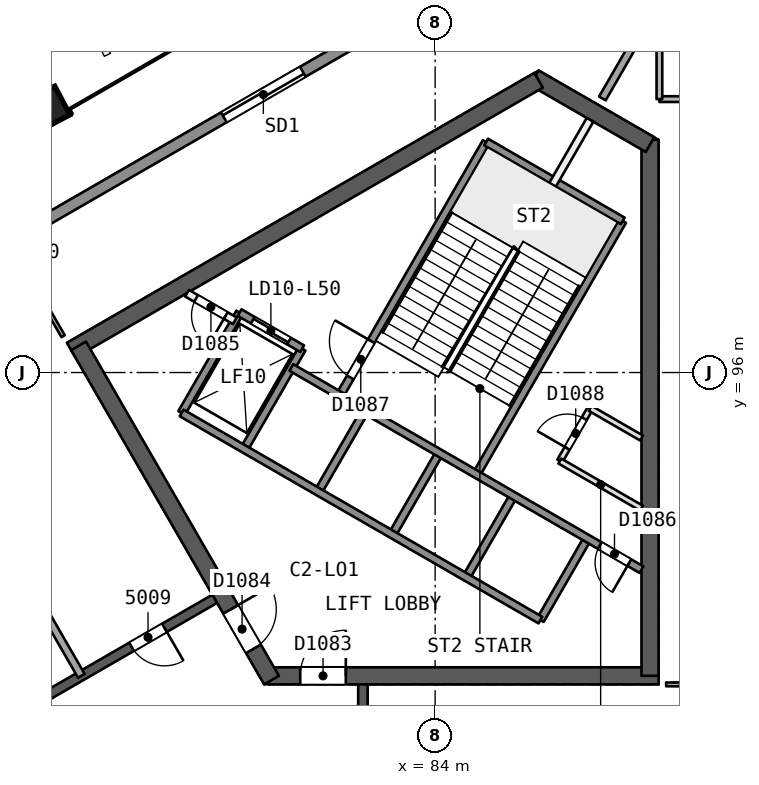
"""IFC4 building model, lengths in metres.
Left out: names, types, materials, properties, quantities, classifications, styles, units other than length and angle.
Written with IfcOpenShell. Run it as: python <this file> out.ifc"""

import sys

from ifc_helpers import new_model, si_unit, direction, frame, frame_2d, origin, origin_2d, place, context, subcontext, project, spatial, rectangle, extrude, element, fill, save


model = new_model("IFC4")
c1 = context("Model", 3, precision=1e-05, world=origin(), true_north=direction((0.0, 1.0)))
c2 = subcontext(c1, "Body", "Model", "MODEL_VIEW")
j1 = project(units=[si_unit("LENGTHUNIT", "METRE"), si_unit("PLANEANGLEUNIT", "RADIAN")], contexts=[c1])
p1 = place(None, origin())
s1 = spatial("IfcSite", under=j1, at=p1, CompositionType="ELEMENT")
p2 = place(p1, origin())
s2 = spatial("IfcBuilding", under=s1, at=p2, CompositionType="ELEMENT")
p3 = place(p2, frame((0.0, 0.0, 205.8)))
s3 = spatial("IfcBuildingStorey", under=s2, at=p3, CompositionType="ELEMENT", Elevation=205.8)
p4 = place(p3, frame((79.63, 88.019, 0.0), z_axis=(0.0, 0.0, 1.0), x_axis=(1.0, 0.0, 0.0)))
e1 = element("IfcWall", 1, at=p4, inside=s3, PredefinedType="SHEAR", context=c2, shape_type="SweptSolid", body=[
    extrude(rectangle(XDim=10.25, YDim=0.45, at=frame_2d((5.125, 0.0))), origin(), (0.0, 0.0, 1.0), 3.7),
])
p5 = place(p4, frame((0.82, 0.0, 0.0)))
e2 = element("IfcOpeningElement", 2, at=p5, cuts=e1, PredefinedType="OPENING", context=c2, shape_type="SweptSolid", body=[
    extrude(rectangle(XDim=1.2, YDim=2.1, at=frame_2d((0.6, 1.05))), frame((0.0, 0.235, 0.0), z_axis=(0.0, -1.0, 0.0), x_axis=(1.0, 0.0, 0.0)), (0.0, 0.0, 1.0), 0.471),
])
p6 = place(p3, frame((89.655, 88.019, 0.0), z_axis=(0.0, 0.0, 1.0), x_axis=(0.0, 1.0, 0.0)))
e3 = element("IfcWall", 3, at=p6, inside=s3, PredefinedType="SHEAR", context=c2, shape_type="SweptSolid", body=[
    extrude(rectangle(XDim=14.108, YDim=0.45, at=frame_2d((7.054, 0.0))), origin(), (0.0, 0.0, 1.0), 3.7),
])
p7 = place(p3, frame((89.655, 101.998, 0.0), z_axis=(0.0, 0.0, 1.0), x_axis=(-0.866042179588, 0.49997094233, 0.0)))
e4 = element("IfcWall", 4, at=p7, inside=s3, PredefinedType="SHEAR", context=c2, shape_type="SweptSolid", body=[
    extrude(rectangle(XDim=3.515, YDim=0.45, at=frame_2d((1.758, 0.0))), origin(), (0.0, 0.0, 1.0), 3.7),
])
p8 = place(p3, frame((86.723, 103.69, 0.0), z_axis=(0.0, 0.0, 1.0), x_axis=(-0.866022713978, -0.500004658852, 0.0)))
e5 = element("IfcWall", 5, at=p8, inside=s3, PredefinedType="SHEAR", context=c2, shape_type="SweptSolid", body=[
    extrude(rectangle(XDim=14.203, YDim=0.45, at=frame_2d((7.102, 0.0))), origin(), (0.0, 0.0, 1.0), 3.7),
])
p9 = place(p3, frame((74.617, 96.701, 0.0), z_axis=(0.0, 0.0, 1.0), x_axis=(0.499994385119, -0.866028645513, 0.0)))
e6 = element("IfcWall", 6, at=p9, inside=s3, PredefinedType="SHEAR", context=c2, shape_type="SweptSolid", body=[
    extrude(rectangle(XDim=10.155, YDim=0.45, at=frame_2d((5.077, 0.0))), origin(), (0.0, 0.0, 1.0), 3.7),
])
p10 = place(p9, frame((8.005, 0.0, 0.0)))
e7 = element("IfcOpeningElement", 7, at=p10, cuts=e6, PredefinedType="OPENING", context=c2, shape_type="SweptSolid", body=[
    extrude(rectangle(XDim=1.2, YDim=2.1, at=frame_2d((0.6, 1.05))), frame((0.0, 0.235, 0.0), z_axis=(0.0, -1.0, 0.0), x_axis=(1.0, 0.0, 0.0)), (0.0, 0.0, 1.0), 0.471),
])
p11 = place(p3, frame((82.1, 72.206, 0.0), z_axis=(0.0, 0.0, 1.0), x_axis=(0.0, 1.0, 0.0)))
e8 = element("IfcWall", 8, at=p11, inside=s3, PredefinedType="SHEAR", context=c2, shape_type="SweptSolid", body=[
    extrude(rectangle(XDim=15.588, YDim=0.25, at=frame_2d((7.794, 0.0))), origin(), (0.0, 0.0, 1.0), 3.3),
])
p12 = place(p11, frame((2.618, 0.0, 0.0)))
e9 = element("IfcOpeningElement", 9, at=p12, cuts=e8, PredefinedType="OPENING", context=c2, shape_type="SweptSolid", body=[
    extrude(rectangle(XDim=1.0, YDim=2.1, at=frame_2d((0.5, 1.05))), frame((0.0, 0.135, 0.0), z_axis=(0.0, -1.0, 0.0), x_axis=(1.0, 0.0, 0.0)), (0.0, 0.0, 1.0), 0.271),
])
p13 = place(p11, frame((8.627, 0.0, 0.0)))
e10 = element("IfcOpeningElement", 10, at=p13, cuts=e8, PredefinedType="OPENING", context=c2, shape_type="SweptSolid", body=[
    extrude(rectangle(XDim=1.1, YDim=2.1, at=frame_2d((0.55, 1.05))), frame((0.0, 0.135, 0.0), z_axis=(0.0, -1.0, 0.0), x_axis=(1.0, 0.0, 0.0)), (0.0, 0.0, 1.0), 0.271),
])
p14 = place(p11, frame((12.282, 0.0, 0.0)))
e11 = element("IfcOpeningElement", 11, at=p14, cuts=e8, PredefinedType="OPENING", context=c2, shape_type="SweptSolid", body=[
    extrude(rectangle(XDim=1.0, YDim=2.1, at=frame_2d((0.5, 1.05))), frame((0.0, 0.135, 0.0), z_axis=(0.0, -1.0, 0.0), x_axis=(1.0, 0.0, 0.0)), (0.0, 0.0, 1.0), 0.271),
])
p15 = place(p3, frame((78.2, 90.046, 0.0), z_axis=(0.0, 0.0, 1.0), x_axis=(-0.866026492143, -0.499998114903, 0.0)))
e12 = element("IfcWall", 12, at=p15, inside=s3, PredefinedType="SHEAR", context=c2, shape_type="SweptSolid", body=[
    extrude(rectangle(XDim=15.588, YDim=0.25, at=frame_2d((7.794, 0.0))), origin(), (0.0, 0.0, 1.0), 3.3),
])
p16 = place(p15, frame((1.527, 0.0, 0.0)))
e13 = element("IfcOpeningElement", 13, at=p16, cuts=e12, PredefinedType="OPENING", context=c2, shape_type="SweptSolid", body=[
    extrude(rectangle(XDim=1.0, YDim=2.1, at=frame_2d((0.5, 1.05))), frame((0.0, 0.135, 0.0), z_axis=(0.0, -1.0, 0.0), x_axis=(1.0, 0.0, 0.0)), (0.0, 0.0, 1.0), 0.271),
])
p17 = place(p15, frame((8.694, 0.0, 0.0)))
e14 = element("IfcOpeningElement", 14, at=p17, cuts=e12, PredefinedType="OPENING", context=c2, shape_type="SweptSolid", body=[
    extrude(rectangle(XDim=1.1, YDim=2.1, at=frame_2d((0.55, 1.05))), frame((0.0, 0.135, 0.0), z_axis=(0.0, -1.0, 0.0), x_axis=(1.0, 0.0, 0.0)), (0.0, 0.0, 1.0), 0.271),
])
p18 = place(p15, frame((13.062, 0.0, 0.0)))
e15 = element("IfcOpeningElement", 15, at=p18, cuts=e12, PredefinedType="OPENING", context=c2, shape_type="SweptSolid", body=[
    extrude(rectangle(XDim=1.0, YDim=2.1, at=frame_2d((0.5, 1.05))), frame((0.0, 0.135, 0.0), z_axis=(0.0, -1.0, 0.0), x_axis=(1.0, 0.0, 0.0)), (0.0, 0.0, 1.0), 0.271),
])
p19 = place(p3, frame((73.813, 102.987, 0.0), z_axis=(0.000857578916, -0.022824792675, 0.999739112668), x_axis=(0.866059992904, 0.499826241631, 0.010668498825)))
e16 = element("IfcColumn", 16, at=p19, inside=s3, PredefinedType="COLUMN", context=c2, shape_type="SweptSolid", body=[
    extrude(rectangle(XDim=0.85, YDim=0.85, at=origin_2d()), origin(), (0.0, 0.0, 1.0), 3.701),
])
p20 = place(p3, frame((92.802, 87.794, 0.0), z_axis=(0.0, 0.0, 1.0), x_axis=(-1.0, 0.0, 0.0)))
e17 = element("IfcWall", 17, at=p20, inside=s3, PredefinedType="PARTITIONING", context=c2, shape_type="SweptSolid", body=[
    extrude(rectangle(XDim=2.723, YDim=0.1, at=frame_2d((1.361, 0.0))), origin(), (0.0, 0.0, 1.0), 3.3),
])
p21 = place(p20, frame((0.911, 0.0, 0.0)))
e18 = element("IfcOpeningElement", 18, at=p21, cuts=e17, PredefinedType="OPENING", context=c2, shape_type="SweptSolid", body=[
    extrude(rectangle(XDim=0.9, YDim=2.1, at=frame_2d((0.45, 1.05))), frame((0.0, 0.061, 0.0), z_axis=(0.0, -1.0, 0.0), x_axis=(1.0, 0.0, 0.0)), (0.0, 0.0, 1.0), 0.121),
])
p22 = place(p3, frame((92.802, 103.194, 0.0), z_axis=(0.0, 0.0, 1.0), x_axis=(-1.0, 0.0, 0.0)))
e19 = element("IfcWall", 19, at=p22, inside=s3, PredefinedType="PARTITIONING", context=c2, shape_type="SweptSolid", body=[
    extrude(rectangle(XDim=2.9, YDim=0.15, at=frame_2d((1.45, 0.0))), origin(), (0.0, 0.0, 1.0), 3.3),
])
p23 = place(p22, frame((1.05, 0.0, 0.0)))
e20 = element("IfcOpeningElement", 20, at=p23, cuts=e19, PredefinedType="OPENING", context=c2, shape_type="SweptSolid", body=[
    extrude(rectangle(XDim=0.8, YDim=2.1, at=frame_2d((0.4, 1.05))), frame((0.0, 0.085, 0.0), z_axis=(0.0, -1.0, 0.0), x_axis=(1.0, 0.0, 0.0)), (0.0, 0.0, 1.0), 0.171),
])
p24 = place(p3, frame((89.902, 103.194, 0.0), z_axis=(0.0, 0.0, 1.0), x_axis=(0.0, 1.0, 0.0)))
e21 = element("IfcWall", 21, at=p24, inside=s3, PredefinedType="PARTITIONING", context=c2, shape_type="SweptSolid", body=[
    extrude(rectangle(XDim=2.6, YDim=0.15, at=frame_2d((1.3, 0.0))), origin(), (0.0, 0.0, 1.0), 3.3),
])
p25 = place(p3, frame((90.59, 107.002, 0.0), z_axis=(0.0, 0.0, 1.0), x_axis=(-0.500002498361, -0.86602396135, 0.0)))
e22 = element("IfcWall", 22, at=p25, inside=s3, PredefinedType="PARTITIONING", context=c2, shape_type="SweptSolid", body=[
    extrude(rectangle(XDim=4.377, YDim=0.2, at=frame_2d((2.188, 0.0))), origin(), (0.0, 0.0, 1.0), 3.3),
])
p26 = place(p3, frame((74.21, 96.956, 0.0), z_axis=(0.0, 0.0, 1.0), x_axis=(-0.499957886064, 0.866049716911, 0.0)))
e23 = element("IfcWall", 23, at=p26, inside=s3, PredefinedType="PARTITIONING", context=c2, shape_type="SweptSolid", body=[
    extrude(rectangle(XDim=2.723, YDim=0.1, at=frame_2d((1.361, 0.0))), origin(), (0.0, 0.0, 1.0), 3.3),
])
p27 = place(p26, frame((0.911, 0.0, 0.0)))
e24 = element("IfcOpeningElement", 24, at=p27, cuts=e23, PredefinedType="OPENING", context=c2, shape_type="SweptSolid", body=[
    extrude(rectangle(XDim=0.9, YDim=2.1, at=frame_2d((0.45, 1.05))), frame((0.0, 0.061, 0.0), z_axis=(0.0, -1.0, 0.0), x_axis=(1.0, 0.0, 0.0)), (0.0, 0.0, 1.0), 0.121),
])
p28 = place(p3, frame((69.339, 97.287, 0.0), z_axis=(0.0, 0.0, 1.0), x_axis=(0.499993653641, -0.866029067825, 0.0)))
e25 = element("IfcWall", 25, at=p28, inside=s3, PredefinedType="PARTITIONING", context=c2, shape_type="SweptSolid", body=[
    extrude(rectangle(XDim=10.702, YDim=0.2, at=frame_2d((5.351, 0.0))), origin(), (0.0, 0.0, 1.0), 3.3),
])
p29 = place(p3, frame((43.672, 82.641, 0.0), z_axis=(0.0, 0.0, 1.0), x_axis=(0.866024917385, 0.500000842468, 0.0)))
e26 = element("IfcWall", 26, at=p29, inside=s3, PredefinedType="SOLIDWALL", context=c2, shape_type="SweptSolid", body=[
    extrude(rectangle(XDim=51.621, YDim=0.3, at=frame_2d((25.811, 0.0))), origin(), (0.0, 0.0, 1.0), 3.3),
])
p30 = place(p29, frame((24.611, 0.0, 0.0)))
e27 = element("IfcOpeningElement", 27, at=p30, cuts=e26, PredefinedType="OPENING", context=c2, shape_type="SweptSolid", body=[
    extrude(rectangle(XDim=2.4, YDim=2.4, at=frame_2d((1.2, 1.2))), frame((0.0, 0.161, 0.0), z_axis=(0.0, -1.0, 0.0), x_axis=(1.0, 0.0, 0.0)), (0.0, 0.0, 1.0), 0.321),
])
p31 = place(p29, frame((30.378, 0.0, 0.0)))
e28 = element("IfcOpeningElement", 28, at=p31, cuts=e26, PredefinedType="OPENING", context=c2, shape_type="SweptSolid", body=[
    extrude(rectangle(XDim=2.4, YDim=2.4, at=frame_2d((1.2, 1.2))), frame((0.0, 0.161, 0.0), z_axis=(0.0, -1.0, 0.0), x_axis=(1.0, 0.0, 0.0)), (0.0, 0.0, 1.0), 0.321),
])
p32 = place(p29, frame((40.147, 0.0, 0.0)))
e29 = element("IfcOpeningElement", 29, at=p32, cuts=e26, PredefinedType="OPENING", context=c2, shape_type="SweptSolid", body=[
    extrude(rectangle(XDim=2.4, YDim=2.4, at=frame_2d((1.2, 1.2))), frame((0.0, 0.161, 0.0), z_axis=(0.0, -1.0, 0.0), x_axis=(1.0, 0.0, 0.0)), (0.0, 0.0, 1.0), 0.321),
])
p33 = place(p29, frame((18.843, 0.0, 0.0)))
e30 = element("IfcOpeningElement", 30, at=p33, cuts=e26, PredefinedType="OPENING", context=c2, shape_type="SweptSolid", body=[
    extrude(rectangle(XDim=2.4, YDim=2.4, at=frame_2d((1.2, 1.2))), frame((0.0, 0.161, 0.0), z_axis=(0.0, -1.0, 0.0), x_axis=(1.0, 0.0, 0.0)), (0.0, 0.0, 1.0), 0.321),
])
p34 = place(p29, frame((9.107, 0.0, 0.0)))
e31 = element("IfcOpeningElement", 31, at=p34, cuts=e26, PredefinedType="OPENING", context=c2, shape_type="SweptSolid", body=[
    extrude(rectangle(XDim=2.4, YDim=2.4, at=frame_2d((1.2, 1.2))), frame((0.0, 0.161, 0.0), z_axis=(0.0, -1.0, 0.0), x_axis=(1.0, 0.0, 0.0)), (0.0, 0.0, 1.0), 0.321),
])
p35 = place(p3, frame((86.77, 89.486, 0.0), z_axis=(0.0, 0.0, 1.0), x_axis=(0.499961042966, 0.86604789447, 0.0)))
e32 = element("IfcWall", 32, at=p35, inside=s3, PredefinedType="SOLIDWALL", context=c2, shape_type="SweptSolid", body=[
    extrude(rectangle(XDim=2.48, YDim=0.2, at=frame_2d((1.24, 0.0))), origin(), (0.0, 0.0, 1.0), 3.3),
])
p36 = place(p3, frame((87.281, 93.671, 0.0), z_axis=(0.0, 0.0, 1.0), x_axis=(0.499880961361, 0.866094119867, 0.0)))
e33 = element("IfcWall", 33, at=p36, inside=s3, PredefinedType="PARTITIONING", context=c2, shape_type="SweptSolid", body=[
    extrude(rectangle(XDim=1.6, YDim=0.15, at=frame_2d((0.8, 0.0))), origin(), (0.0, 0.0, 1.0), 3.3),
])
p37 = place(p36, frame((0.387, 0.0, 0.0)))
e34 = element("IfcOpeningElement", 34, at=p37, cuts=e33, PredefinedType="OPENING", context=c2, shape_type="SweptSolid", body=[
    extrude(rectangle(XDim=0.9, YDim=2.1, at=frame_2d((0.45, 1.05))), frame((0.0, 0.085, 0.0), z_axis=(0.0, -1.0, 0.0), x_axis=(1.0, 0.0, 0.0)), (0.0, 0.0, 1.0), 0.171),
])
p38 = place(p3, frame((84.821, 90.611, 0.0), z_axis=(0.0, 0.0, 1.0), x_axis=(0.499961042966, 0.86604789447, 0.0)))
e35 = element("IfcWall", 35, at=p38, inside=s3, PredefinedType="SOLIDWALL", context=c2, shape_type="SweptSolid", body=[
    extrude(rectangle(XDim=2.48, YDim=0.2, at=frame_2d((1.24, 0.0))), origin(), (0.0, 0.0, 1.0), 3.3),
])
p39 = place(p3, frame((85.087, 93.321, 0.0), z_axis=(0.0, 0.0, 1.0), x_axis=(0.500019787375, 0.866013979237, 0.0)))
e36 = element("IfcWall", 36, at=p39, inside=s3, PredefinedType="SOLIDWALL", context=c2, shape_type="SweptSolid", body=[
    extrude(rectangle(XDim=7.7, YDim=0.2, at=frame_2d((3.85, 0.0))), origin(), (0.0, 0.0, 1.0), 3.3),
])
p40 = place(p3, frame((82.873, 91.736, 0.0), z_axis=(0.0, 0.0, 1.0), x_axis=(0.499961042966, 0.86604789447, 0.0)))
e37 = element("IfcWall", 37, at=p40, inside=s3, PredefinedType="SOLIDWALL", context=c2, shape_type="SweptSolid", body=[
    extrude(rectangle(XDim=2.48, YDim=0.2, at=frame_2d((1.24, 0.0))), origin(), (0.0, 0.0, 1.0), 3.3),
])
p41 = place(p3, frame((87.09, 100.94, 0.0), z_axis=(0.0, 0.0, 1.0), x_axis=(0.500011643316, 0.866018681408, 0.0)))
e38 = element("IfcWall", 38, at=p41, inside=s3, PredefinedType="PARTITIONING", context=c2, shape_type="SweptSolid", body=[
    extrude(rectangle(XDim=1.973, YDim=0.2, at=frame_2d((0.987, 0.0))), origin(), (0.0, 0.0, 1.0), 3.3),
])
p42 = place(p3, frame((80.924, 92.861, 0.0), z_axis=(0.0, 0.0, 1.0), x_axis=(0.499961042966, 0.86604789447, 0.0)))
e39 = element("IfcWall", 39, at=p42, inside=s3, PredefinedType="SOLIDWALL", context=c2, shape_type="SweptSolid", body=[
    extrude(rectangle(XDim=2.48, YDim=0.2, at=frame_2d((1.24, 0.0))), origin(), (0.0, 0.0, 1.0), 3.3),
])
p43 = place(p3, frame((81.493, 95.396, 0.0), z_axis=(0.0, 0.0, 1.0), x_axis=(0.500006057782, 0.866021906294, 0.0)))
e40 = element("IfcWall", 40, at=p43, inside=s3, PredefinedType="SOLIDWALL", context=c2, shape_type="SweptSolid", body=[
    extrude(rectangle(XDim=7.7, YDim=0.2, at=frame_2d((3.85, 0.0))), origin(), (0.0, 0.0, 1.0), 3.3),
])
p44 = place(p43, frame((0.55, 0.0, 0.0)))
e41 = element("IfcOpeningElement", 41, at=p44, cuts=e40, PredefinedType="OPENING", context=c2, shape_type="SweptSolid", body=[
    extrude(rectangle(XDim=1.1, YDim=2.1, at=frame_2d((0.55, 1.05))), frame((0.0, 0.11, 0.0), z_axis=(0.0, -1.0, 0.0), x_axis=(1.0, 0.0, 0.0)), (0.0, 0.0, 1.0), 0.221),
])
for number, where, z_axis, x_axis in (
    (42, (78.976, 93.986, 0.0), (0.0, 0.0, 1.0), (0.5, 0.866, 0.0)),
    (43, (77.33, 94.936, 0.0), (0.0, 0.0, 1.0), (0.5, 0.866, 0.0)),
):
    element("IfcWall", number, at=place(p3, frame(where, z_axis=z_axis, x_axis=x_axis)), inside=s3, PredefinedType="SOLIDWALL", context=c2, shape_type="SweptSolid", body=[
        extrude(rectangle(XDim=3.05, YDim=0.2, at=frame_2d((1.525, 0.0))), origin(), (0.0, 0.0, 1.0), 3.3),
    ])
p45 = place(p3, frame((86.77, 89.486, 0.0), z_axis=(0.0, 0.0, 1.0), x_axis=(-0.86601811187, 0.500012629753, 0.0)))
e44 = element("IfcWall", 44, at=p45, inside=s3, PredefinedType="SOLIDWALL", context=c2, shape_type="SweptSolid", body=[
    extrude(rectangle(XDim=10.9, YDim=0.2, at=frame_2d((5.45, 0.0))), origin(), (0.0, 0.0, 1.0), 3.3),
])
p46 = place(p3, frame((89.43, 90.814, 0.0), z_axis=(0.0, 0.0, 1.0), x_axis=(-0.866018983788, 0.500011119594, 0.0)))
e45 = element("IfcWall", 45, at=p46, inside=s3, PredefinedType="SOLIDWALL", context=c2, shape_type="SweptSolid", body=[
    extrude(rectangle(XDim=10.64, YDim=0.2, at=frame_2d((5.32, 0.0))), origin(), (0.0, 0.0, 1.0), 3.3),
])
p47 = place(p46, frame((0.37, 0.0, 0.0)))
e46 = element("IfcOpeningElement", 46, at=p47, cuts=e45, PredefinedType="OPENING", context=c2, shape_type="SweptSolid", body=[
    extrude(rectangle(XDim=0.9, YDim=2.1, at=frame_2d((0.45, 1.05))), frame((0.0, 0.11, 0.0), z_axis=(0.0, -1.0, 0.0), x_axis=(1.0, 0.0, 0.0)), (0.0, 0.0, 1.0), 0.221),
])
p48 = place(p3, frame((78.73, 97.361, 0.0), z_axis=(0.0, 0.0, 1.0), x_axis=(-0.866045896294, 0.499964504253, 0.0)))
e47 = element("IfcWall", 47, at=p48, inside=s3, PredefinedType="PARTITIONING", context=c2, shape_type="SweptSolid", body=[
    extrude(rectangle(XDim=1.455, YDim=0.2, at=frame_2d((0.728, 0.0))), origin(), (0.0, 0.0, 1.0), 3.3),
])
p49 = place(p48, frame((0.278, 0.0, 0.0)))
e48 = element("IfcOpeningElement", 48, at=p49, cuts=e47, PredefinedType="OPENING", context=c2, shape_type="SweptSolid", body=[
    extrude(rectangle(XDim=0.9, YDim=2.1, at=frame_2d((0.45, 1.05))), frame((0.0, 0.11, 0.0), z_axis=(0.0, -1.0, 0.0), x_axis=(1.0, 0.0, 0.0)), (0.0, 0.0, 1.0), 0.221),
])
p50 = place(p3, frame((80.5, 96.627, 0.0), z_axis=(0.0, 0.0, 1.0), x_axis=(-0.86601224135, 0.500022797313, 0.0)))
e49 = element("IfcWall", 49, at=p50, inside=s3, PredefinedType="SOLIDWALL", context=c2, shape_type="SweptSolid", body=[
    extrude(rectangle(XDim=1.9, YDim=0.2, at=frame_2d((0.95, 0.0))), origin(), (0.0, 0.0, 1.0), 3.3),
])
p51 = place(p50, frame((0.4, 0.0, 0.0)))
e50 = element("IfcOpeningElement", 50, at=p51, cuts=e49, PredefinedType="OPENING", context=c2, shape_type="SweptSolid", body=[
    extrude(rectangle(XDim=1.1, YDim=2.1, at=frame_2d((0.55, 1.05))), frame((0.0, 0.11, 0.0), z_axis=(0.0, -1.0, 0.0), x_axis=(1.0, 0.0, 0.0)), (0.0, 0.0, 1.0), 0.221),
])
p52 = place(p3, frame((89.43, 92.43, 0.0), z_axis=(0.0, 0.0, 1.0), x_axis=(-0.866018462269, 0.500012022864, 0.0)))
e51 = element("IfcWall", 51, at=p52, inside=s3, PredefinedType="PARTITIONING", context=c2, shape_type="SweptSolid", body=[
    extrude(rectangle(XDim=2.481, YDim=0.15, at=frame_2d((1.241, 0.0))), origin(), (0.0, 0.0, 1.0), 3.3),
])
p53 = place(p3, frame((89.43, 94.278, 0.0), z_axis=(0.0, 0.0, 1.0), x_axis=(-0.86598723706, 0.500066100879, 0.0)))
e52 = element("IfcWall", 52, at=p53, inside=s3, PredefinedType="PARTITIONING", context=c2, shape_type="SweptSolid", body=[
    extrude(rectangle(XDim=1.558, YDim=0.15, at=frame_2d((0.779, 0.0))), origin(), (0.0, 0.0, 1.0), 3.3),
])
p54 = place(p3, frame((88.937, 99.99, 0.0), z_axis=(0.0, 0.0, 1.0), x_axis=(-0.866004344652, 0.500036473714, 0.0)))
e53 = element("IfcWall", 53, at=p54, inside=s3, PredefinedType="SOLIDWALL", context=c2, shape_type="SweptSolid", body=[
    extrude(rectangle(XDim=4.15, YDim=0.2, at=frame_2d((2.075, 0.0))), origin(), (0.0, 0.0, 1.0), 3.3),
])
p55 = place(p16, origin())
e54 = element("IfcDoor", 54, at=p55, inside=s3, OperationType="SINGLE_SWING_LEFT", PredefinedType="NOTDEFINED", context=c2, shape_type="SweptSolid", body=[
    extrude(rectangle(XDim=1.0, YDim=2.1, at=frame_2d((0.5, 1.05))), frame((0.0, 0.025, 0.0), z_axis=(0.0, -1.0, 0.0), x_axis=(1.0, 0.0, 0.0)), (0.0, 0.0, 1.0), 0.05),
])
fill(e13, e54)
p56 = place(p32, origin())
e55 = element("IfcDoor", 55, at=p56, inside=s3, OperationType="SLIDING_TO_LEFT", PredefinedType="NOTDEFINED", context=c2, shape_type="SweptSolid", body=[
    extrude(rectangle(XDim=2.4, YDim=2.4, at=frame_2d((1.2, 1.2))), frame((0.0, 0.025, 0.0), z_axis=(0.0, -1.0, 0.0), x_axis=(1.0, 0.0, 0.0)), (0.0, 0.0, 1.0), 0.05),
])
fill(e29, e55)
p57 = place(p5, origin())
e56 = element("IfcDoor", 56, at=p57, inside=s3, OperationType="SINGLE_SWING_RIGHT", PredefinedType="NOTDEFINED", context=c2, shape_type="SweptSolid", body=[
    extrude(rectangle(XDim=1.2, YDim=2.1, at=frame_2d((0.6, 1.05))), frame((0.0, 0.025, 0.0), z_axis=(0.0, -1.0, 0.0), x_axis=(1.0, 0.0, 0.0)), (0.0, 0.0, 1.0), 0.05),
])
fill(e2, e56)
p58 = place(p10, origin())
e57 = element("IfcDoor", 57, at=p58, inside=s3, OperationType="SINGLE_SWING_LEFT", PredefinedType="NOTDEFINED", context=c2, shape_type="SweptSolid", body=[
    extrude(rectangle(XDim=1.2, YDim=2.1, at=frame_2d((0.6, 1.05))), frame((0.0, 0.025, 0.0), z_axis=(0.0, -1.0, 0.0), x_axis=(1.0, 0.0, 0.0)), (0.0, 0.0, 1.0), 0.05),
])
fill(e7, e57)
p59 = place(p51, origin())
e58 = element("IfcDoor", 58, at=p59, inside=s3, OperationType="SLIDING_TO_RIGHT", PredefinedType="NOTDEFINED", context=c2, shape_type="SweptSolid", body=[
    extrude(rectangle(XDim=1.1, YDim=2.1, at=frame_2d((0.55, 1.05))), frame((0.0, 0.025, 0.0), z_axis=(0.0, -1.0, 0.0), x_axis=(1.0, 0.0, 0.0)), (0.0, 0.0, 1.0), 0.05),
])
fill(e50, e58)
p60 = place(p49, origin())
e59 = element("IfcDoor", 59, at=p60, inside=s3, OperationType="SINGLE_SWING_LEFT", PredefinedType="NOTDEFINED", context=c2, shape_type="SweptSolid", body=[
    extrude(rectangle(XDim=0.9, YDim=2.1, at=frame_2d((0.45, 1.05))), frame((0.0, 0.025, 0.0), z_axis=(0.0, -1.0, 0.0), x_axis=(1.0, 0.0, 0.0)), (0.0, 0.0, 1.0), 0.05),
])
fill(e48, e59)
p61 = place(p47, origin())
e60 = element("IfcDoor", 60, at=p61, inside=s3, OperationType="SINGLE_SWING_LEFT", PredefinedType="NOTDEFINED", context=c2, shape_type="SweptSolid", body=[
    extrude(rectangle(XDim=0.9, YDim=2.1, at=frame_2d((0.45, 1.05))), frame((0.0, 0.025, 0.0), z_axis=(0.0, -1.0, 0.0), x_axis=(1.0, 0.0, 0.0)), (0.0, 0.0, 1.0), 0.05),
])
fill(e46, e60)
p62 = place(p44, origin())
e61 = element("IfcDoor", 61, at=p62, inside=s3, OperationType="SINGLE_SWING_RIGHT", PredefinedType="NOTDEFINED", context=c2, shape_type="SweptSolid", body=[
    extrude(rectangle(XDim=1.1, YDim=2.1, at=frame_2d((0.55, 1.05))), frame((0.0, 0.025, 0.0), z_axis=(0.0, -1.0, 0.0), x_axis=(1.0, 0.0, 0.0)), (0.0, 0.0, 1.0), 0.05),
])
fill(e41, e61)
p63 = place(p37, origin())
e62 = element("IfcDoor", 62, at=p63, inside=s3, OperationType="SINGLE_SWING_LEFT", PredefinedType="NOTDEFINED", context=c2, shape_type="SweptSolid", body=[
    extrude(rectangle(XDim=0.9, YDim=2.1, at=frame_2d((0.45, 1.05))), frame((0.0, 0.025, 0.0), z_axis=(0.0, -1.0, 0.0), x_axis=(1.0, 0.0, 0.0)), (0.0, 0.0, 1.0), 0.05),
])
fill(e34, e62)
save(model, sys.argv[1])
